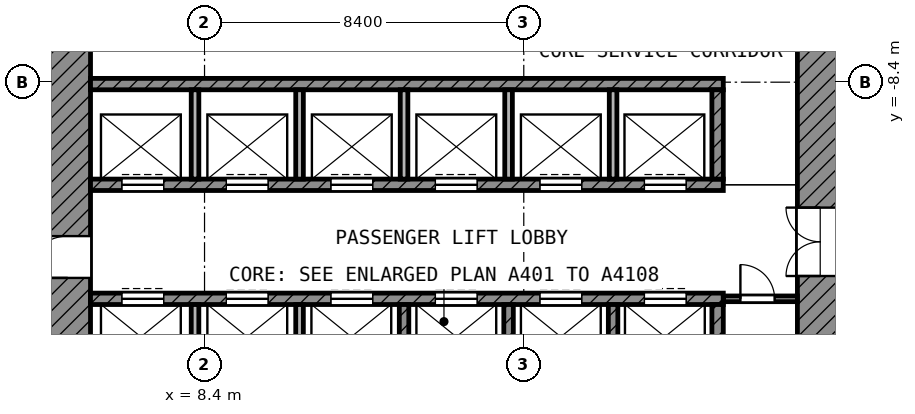
"""IFC4 building model, lengths in metres.
Left out: names, types, materials, properties, quantities, classifications, styles, units other than length and angle.
Written with IfcOpenShell. Run it as: python <this file> out.ifc"""

import sys

from ifc_helpers import new_model, si_unit, direction, frame, frame_2d, origin, place, context, subcontext, project, spatial, rectangle, extrude, element, fill, save


model = new_model("IFC4")
c1 = context("Model", 3, precision=1e-05, world=origin(), true_north=direction((0.0, 1.0)))
c2 = subcontext(c1, "Body", "Model", "MODEL_VIEW")
j1 = project(units=[si_unit("LENGTHUNIT", "METRE"), si_unit("PLANEANGLEUNIT", "RADIAN")], contexts=[c1])
p1 = place(None, origin())
s1 = spatial("IfcSite", under=j1, at=p1, CompositionType="ELEMENT")
p2 = place(p1, origin())
s2 = spatial("IfcBuilding", under=s1, at=p2, CompositionType="ELEMENT")
p3 = place(p2, origin())
s3 = spatial("IfcBuildingStorey", under=s2, at=p3, CompositionType="ELEMENT", Elevation=0.0)
p4 = place(p3, frame((4.8, -25.2, 0.0), z_axis=(0.0, 0.0, 1.0), x_axis=(0.0, 1.0, 0.0)))
e1 = element("IfcWall", 1, at=p4, inside=s3, PredefinedType="SHEAR", context=c2, shape_type="SweptSolid", body=[
    extrude(rectangle(XDim=19.8, YDim=1.2, at=frame_2d((9.9, 0.0))), origin(), (0.0, 0.0, 1.0), 6.65),
])
p5 = place(p4, frame((11.65, 0.0, 0.0)))
e2 = element("IfcOpeningElement", 2, at=p5, cuts=e1, PredefinedType="OPENING", context=c2, shape_type="SweptSolid", body=[
    extrude(rectangle(XDim=1.1, YDim=2.1, at=frame_2d((0.55, 1.05))), frame((0.0, 0.61, 0.0), z_axis=(0.0, -1.0, 0.0), x_axis=(1.0, 0.0, 0.0)), (0.0, 0.0, 1.0), 1.22),
])
p6 = place(p4, frame((2.35, 0.0, 0.0)))
e3 = element("IfcOpeningElement", 3, at=p6, cuts=e1, PredefinedType="OPENING", context=c2, shape_type="SweptSolid", body=[
    extrude(rectangle(XDim=1.1, YDim=2.1, at=frame_2d((0.55, 1.05))), frame((0.0, 0.61, 0.0), z_axis=(0.0, -1.0, 0.0), x_axis=(1.0, 0.0, 0.0)), (0.0, 0.0, 1.0), 1.22),
])
p7 = place(p3, frame((24.6, -24.0, 0.0), z_axis=(0.0, 0.0, 1.0), x_axis=(0.0, 1.0, 0.0)))
e4 = element("IfcWall", 4, at=p7, inside=s3, PredefinedType="SHEAR", context=c2, shape_type="SweptSolid", body=[
    extrude(rectangle(XDim=18.6, YDim=1.2, at=frame_2d((9.3, 0.0))), origin(), (0.0, 0.0, 1.0), 6.65),
])
p8 = place(p7, frame((10.5, 0.0, 0.0)))
e5 = element("IfcOpeningElement", 5, at=p8, cuts=e4, PredefinedType="OPENING", context=c2, shape_type="SweptSolid", body=[
    extrude(rectangle(XDim=1.8, YDim=2.1, at=frame_2d((0.9, 1.05))), frame((0.0, 0.61, 0.0), z_axis=(0.0, -1.0, 0.0), x_axis=(1.0, 0.0, 0.0)), (0.0, 0.0, 1.0), 1.22),
])
p9 = place(p3, frame((5.4, -8.45, 0.0), z_axis=(0.0, 0.0, 1.0), x_axis=(1.0, 0.0, 0.0)))
e6 = element("IfcWall", 6, at=p9, inside=s3, PredefinedType="SHEAR", context=c2, shape_type="SweptSolid", body=[
    extrude(rectangle(XDim=16.65, YDim=0.3, at=frame_2d((8.325, 0.0))), origin(), (0.0, 0.0, 1.0), 6.65),
])
p10 = place(p3, frame((5.4, -11.1, 0.0), z_axis=(0.0, 0.0, 1.0), x_axis=(1.0, 0.0, 0.0)))
e7 = element("IfcWall", 7, at=p10, inside=s3, PredefinedType="SHEAR", context=c2, shape_type="SweptSolid", body=[
    extrude(rectangle(XDim=16.65, YDim=0.3, at=frame_2d((8.325, 0.0))), origin(), (0.0, 0.0, 1.0), 6.65),
])
p11 = place(p10, frame((0.825, 0.0, 0.0)))
e8 = element("IfcOpeningElement", 8, at=p11, cuts=e7, PredefinedType="OPENING", context=c2, shape_type="SweptSolid", body=[
    extrude(rectangle(XDim=1.1, YDim=2.1, at=frame_2d((0.55, 1.05))), frame((0.0, 0.16, 0.0), z_axis=(0.0, -1.0, 0.0), x_axis=(1.0, 0.0, 0.0)), (0.0, 0.0, 1.0), 0.32),
])
p12 = place(p10, frame((3.575, 0.0, 0.0)))
e9 = element("IfcOpeningElement", 9, at=p12, cuts=e7, PredefinedType="OPENING", context=c2, shape_type="SweptSolid", body=[
    extrude(rectangle(XDim=1.1, YDim=2.1, at=frame_2d((0.55, 1.05))), frame((0.0, 0.16, 0.0), z_axis=(0.0, -1.0, 0.0), x_axis=(1.0, 0.0, 0.0)), (0.0, 0.0, 1.0), 0.32),
])
p13 = place(p10, frame((6.325, 0.0, 0.0)))
e10 = element("IfcOpeningElement", 10, at=p13, cuts=e7, PredefinedType="OPENING", context=c2, shape_type="SweptSolid", body=[
    extrude(rectangle(XDim=1.1, YDim=2.1, at=frame_2d((0.55, 1.05))), frame((0.0, 0.16, 0.0), z_axis=(0.0, -1.0, 0.0), x_axis=(1.0, 0.0, 0.0)), (0.0, 0.0, 1.0), 0.32),
])
p14 = place(p10, frame((9.075, 0.0, 0.0)))
e11 = element("IfcOpeningElement", 11, at=p14, cuts=e7, PredefinedType="OPENING", context=c2, shape_type="SweptSolid", body=[
    extrude(rectangle(XDim=1.1, YDim=2.1, at=frame_2d((0.55, 1.05))), frame((0.0, 0.16, 0.0), z_axis=(0.0, -1.0, 0.0), x_axis=(1.0, 0.0, 0.0)), (0.0, 0.0, 1.0), 0.32),
])
p15 = place(p10, frame((11.825, 0.0, 0.0)))
e12 = element("IfcOpeningElement", 12, at=p15, cuts=e7, PredefinedType="OPENING", context=c2, shape_type="SweptSolid", body=[
    extrude(rectangle(XDim=1.1, YDim=2.1, at=frame_2d((0.55, 1.05))), frame((0.0, 0.16, 0.0), z_axis=(0.0, -1.0, 0.0), x_axis=(1.0, 0.0, 0.0)), (0.0, 0.0, 1.0), 0.32),
])
p16 = place(p10, frame((14.575, 0.0, 0.0)))
e13 = element("IfcOpeningElement", 13, at=p16, cuts=e7, PredefinedType="OPENING", context=c2, shape_type="SweptSolid", body=[
    extrude(rectangle(XDim=1.1, YDim=2.1, at=frame_2d((0.55, 1.05))), frame((0.0, 0.16, 0.0), z_axis=(0.0, -1.0, 0.0), x_axis=(1.0, 0.0, 0.0)), (0.0, 0.0, 1.0), 0.32),
])
p17 = place(p3, frame((5.4, -14.1, 0.0), z_axis=(0.0, 0.0, 1.0), x_axis=(1.0, 0.0, 0.0)))
e14 = element("IfcWall", 14, at=p17, inside=s3, PredefinedType="SHEAR", context=c2, shape_type="SweptSolid", body=[
    extrude(rectangle(XDim=16.65, YDim=0.3, at=frame_2d((8.325, 0.0))), origin(), (0.0, 0.0, 1.0), 6.65),
])
p18 = place(p17, frame((0.825, 0.0, 0.0)))
e15 = element("IfcOpeningElement", 15, at=p18, cuts=e14, PredefinedType="OPENING", context=c2, shape_type="SweptSolid", body=[
    extrude(rectangle(XDim=1.1, YDim=2.1, at=frame_2d((0.55, 1.05))), frame((0.0, 0.16, 0.0), z_axis=(0.0, -1.0, 0.0), x_axis=(1.0, 0.0, 0.0)), (0.0, 0.0, 1.0), 0.32),
])
p19 = place(p17, frame((3.575, 0.0, 0.0)))
e16 = element("IfcOpeningElement", 16, at=p19, cuts=e14, PredefinedType="OPENING", context=c2, shape_type="SweptSolid", body=[
    extrude(rectangle(XDim=1.1, YDim=2.1, at=frame_2d((0.55, 1.05))), frame((0.0, 0.16, 0.0), z_axis=(0.0, -1.0, 0.0), x_axis=(1.0, 0.0, 0.0)), (0.0, 0.0, 1.0), 0.32),
])
p20 = place(p17, frame((6.325, 0.0, 0.0)))
e17 = element("IfcOpeningElement", 17, at=p20, cuts=e14, PredefinedType="OPENING", context=c2, shape_type="SweptSolid", body=[
    extrude(rectangle(XDim=1.1, YDim=2.1, at=frame_2d((0.55, 1.05))), frame((0.0, 0.16, 0.0), z_axis=(0.0, -1.0, 0.0), x_axis=(1.0, 0.0, 0.0)), (0.0, 0.0, 1.0), 0.32),
])
p21 = place(p17, frame((9.075, 0.0, 0.0)))
e18 = element("IfcOpeningElement", 18, at=p21, cuts=e14, PredefinedType="OPENING", context=c2, shape_type="SweptSolid", body=[
    extrude(rectangle(XDim=1.1, YDim=2.1, at=frame_2d((0.55, 1.05))), frame((0.0, 0.16, 0.0), z_axis=(0.0, -1.0, 0.0), x_axis=(1.0, 0.0, 0.0)), (0.0, 0.0, 1.0), 0.32),
])
p22 = place(p17, frame((11.825, 0.0, 0.0)))
e19 = element("IfcOpeningElement", 19, at=p22, cuts=e14, PredefinedType="OPENING", context=c2, shape_type="SweptSolid", body=[
    extrude(rectangle(XDim=1.1, YDim=2.1, at=frame_2d((0.55, 1.05))), frame((0.0, 0.16, 0.0), z_axis=(0.0, -1.0, 0.0), x_axis=(1.0, 0.0, 0.0)), (0.0, 0.0, 1.0), 0.32),
])
p23 = place(p17, frame((14.575, 0.0, 0.0)))
e20 = element("IfcOpeningElement", 20, at=p23, cuts=e14, PredefinedType="OPENING", context=c2, shape_type="SweptSolid", body=[
    extrude(rectangle(XDim=1.1, YDim=2.1, at=frame_2d((0.55, 1.05))), frame((0.0, 0.16, 0.0), z_axis=(0.0, -1.0, 0.0), x_axis=(1.0, 0.0, 0.0)), (0.0, 0.0, 1.0), 0.32),
])
p24 = place(p3, frame((21.9, -10.95, 0.0), z_axis=(0.0, 0.0, 1.0), x_axis=(0.0, 1.0, 0.0)))
e21 = element("IfcWall", 21, at=p24, inside=s3, PredefinedType="SHEAR", context=c2, shape_type="SweptSolid", body=[
    extrude(rectangle(XDim=2.35, YDim=0.3, at=frame_2d((1.175, 0.0))), origin(), (0.0, 0.0, 1.0), 6.65),
])
p25 = place(p3, frame((21.9, -16.6, 0.0), z_axis=(0.0, 0.0, 1.0), x_axis=(0.0, 1.0, 0.0)))
e22 = element("IfcWall", 22, at=p25, inside=s3, PredefinedType="SHEAR", context=c2, shape_type="SweptSolid", body=[
    extrude(rectangle(XDim=2.35, YDim=0.3, at=frame_2d((1.175, 0.0))), origin(), (0.0, 0.0, 1.0), 6.65),
])
for number, where, z_axis, x_axis in (
    (23, (8.15, -10.95, 0.0), (0.0, 0.0, 1.0), (0.0, 1.0, 0.0)),
    (24, (10.9, -10.95, 0.0), (0.0, 0.0, 1.0), (0.0, 1.0, 0.0)),
    (25, (13.65, -10.95, 0.0), (0.0, 0.0, 1.0), (0.0, 1.0, 0.0)),
    (26, (16.4, -10.95, 0.0), (0.0, 0.0, 1.0), (0.0, 1.0, 0.0)),
    (27, (19.15, -10.95, 0.0), (0.0, 0.0, 1.0), (0.0, 1.0, 0.0)),
):
    element("IfcWall", number, at=place(p3, frame(where, z_axis=z_axis, x_axis=x_axis)), inside=s3, PredefinedType="PARTITIONING", context=c2, shape_type="SweptSolid", body=[
        extrude(rectangle(XDim=2.35, YDim=0.2, at=frame_2d((1.175, 0.0))), origin(), (0.0, 0.0, 1.0), 6.65),
    ])
for number, where, z_axis, x_axis in (
    (28, (8.15, -16.6, 0.0), (0.0, 0.0, 1.0), (0.0, 1.0, 0.0)),
    (29, (10.9, -16.6, 0.0), (0.0, 0.0, 1.0), (0.0, 1.0, 0.0)),
):
    element("IfcWall", number, at=place(p3, frame(where, z_axis=z_axis, x_axis=x_axis)), inside=s3, PredefinedType="PARTITIONING", context=c2, shape_type="SweptSolid", body=[
        extrude(rectangle(XDim=2.35, YDim=0.2, at=frame_2d((1.175, 0.0))), origin(), (0.0, 0.0, 1.0), 6.65),
    ])
for number, where, z_axis, x_axis in (
    (30, (13.65, -16.6, 0.0), (0.0, 0.0, 1.0), (0.0, 1.0, 0.0)),
    (31, (16.4, -16.6, 0.0), (0.0, 0.0, 1.0), (0.0, 1.0, 0.0)),
    (32, (19.15, -16.6, 0.0), (0.0, 0.0, 1.0), (0.0, 1.0, 0.0)),
):
    element("IfcWall", number, at=place(p3, frame(where, z_axis=z_axis, x_axis=x_axis)), inside=s3, PredefinedType="SHEAR", context=c2, shape_type="SweptSolid", body=[
        extrude(rectangle(XDim=2.35, YDim=0.25, at=frame_2d((1.175, 0.0))), origin(), (0.0, 0.0, 1.0), 6.65),
    ])
p26 = place(p3, frame((22.05, -14.1, 0.0), z_axis=(0.0, 0.0, 1.0), x_axis=(1.0, 0.0, 0.0)))
e33 = element("IfcWall", 33, at=p26, inside=s3, PredefinedType="PARTITIONING", context=c2, shape_type="SweptSolid", body=[
    extrude(rectangle(XDim=1.95, YDim=0.15, at=frame_2d((0.975, 0.0))), origin(), (0.0, 0.0, 1.0), 6.65),
])
p27 = place(p26, frame((0.45, 0.0, 0.0)))
e34 = element("IfcOpeningElement", 34, at=p27, cuts=e33, PredefinedType="OPENING", context=c2, shape_type="SweptSolid", body=[
    extrude(rectangle(XDim=0.9, YDim=2.1, at=frame_2d((0.45, 1.05))), frame((0.0, 0.085, 0.0), z_axis=(0.0, -1.0, 0.0), x_axis=(1.0, 0.0, 0.0)), (0.0, 0.0, 1.0), 0.17),
])
p28 = place(p11, origin())
e35 = element("IfcDoor", 35, at=p28, inside=s3, OperationType="DOUBLE_DOOR_SLIDING", PredefinedType="DOOR", context=c2, shape_type="SweptSolid", body=[
    extrude(rectangle(XDim=1.1, YDim=2.1, at=frame_2d((0.55, 1.05))), frame((0.0, 0.025, 0.0), z_axis=(0.0, -1.0, 0.0), x_axis=(1.0, 0.0, 0.0)), (0.0, 0.0, 1.0), 0.05),
])
fill(e8, e35)
p29 = place(p12, origin())
e36 = element("IfcDoor", 36, at=p29, inside=s3, OperationType="DOUBLE_DOOR_SLIDING", PredefinedType="DOOR", context=c2, shape_type="SweptSolid", body=[
    extrude(rectangle(XDim=1.1, YDim=2.1, at=frame_2d((0.55, 1.05))), frame((0.0, 0.025, 0.0), z_axis=(0.0, -1.0, 0.0), x_axis=(1.0, 0.0, 0.0)), (0.0, 0.0, 1.0), 0.05),
])
fill(e9, e36)
p30 = place(p13, origin())
e37 = element("IfcDoor", 37, at=p30, inside=s3, OperationType="DOUBLE_DOOR_SLIDING", PredefinedType="DOOR", context=c2, shape_type="SweptSolid", body=[
    extrude(rectangle(XDim=1.1, YDim=2.1, at=frame_2d((0.55, 1.05))), frame((0.0, 0.025, 0.0), z_axis=(0.0, -1.0, 0.0), x_axis=(1.0, 0.0, 0.0)), (0.0, 0.0, 1.0), 0.05),
])
fill(e10, e37)
p31 = place(p14, origin())
e38 = element("IfcDoor", 38, at=p31, inside=s3, OperationType="DOUBLE_DOOR_SLIDING", PredefinedType="DOOR", context=c2, shape_type="SweptSolid", body=[
    extrude(rectangle(XDim=1.1, YDim=2.1, at=frame_2d((0.55, 1.05))), frame((0.0, 0.025, 0.0), z_axis=(0.0, -1.0, 0.0), x_axis=(1.0, 0.0, 0.0)), (0.0, 0.0, 1.0), 0.05),
])
fill(e11, e38)
p32 = place(p15, origin())
e39 = element("IfcDoor", 39, at=p32, inside=s3, OperationType="DOUBLE_DOOR_SLIDING", PredefinedType="DOOR", context=c2, shape_type="SweptSolid", body=[
    extrude(rectangle(XDim=1.1, YDim=2.1, at=frame_2d((0.55, 1.05))), frame((0.0, 0.025, 0.0), z_axis=(0.0, -1.0, 0.0), x_axis=(1.0, 0.0, 0.0)), (0.0, 0.0, 1.0), 0.05),
])
fill(e12, e39)
p33 = place(p16, origin())
e40 = element("IfcDoor", 40, at=p33, inside=s3, OperationType="DOUBLE_DOOR_SLIDING", PredefinedType="DOOR", context=c2, shape_type="SweptSolid", body=[
    extrude(rectangle(XDim=1.1, YDim=2.1, at=frame_2d((0.55, 1.05))), frame((0.0, 0.025, 0.0), z_axis=(0.0, -1.0, 0.0), x_axis=(1.0, 0.0, 0.0)), (0.0, 0.0, 1.0), 0.05),
])
fill(e13, e40)
p34 = place(p18, origin())
e41 = element("IfcDoor", 41, at=p34, inside=s3, OperationType="DOUBLE_DOOR_SLIDING", PredefinedType="DOOR", context=c2, shape_type="SweptSolid", body=[
    extrude(rectangle(XDim=1.1, YDim=2.1, at=frame_2d((0.55, 1.05))), frame((0.0, 0.025, 0.0), z_axis=(0.0, -1.0, 0.0), x_axis=(1.0, 0.0, 0.0)), (0.0, 0.0, 1.0), 0.05),
])
fill(e15, e41)
p35 = place(p19, origin())
e42 = element("IfcDoor", 42, at=p35, inside=s3, OperationType="DOUBLE_DOOR_SLIDING", PredefinedType="DOOR", context=c2, shape_type="SweptSolid", body=[
    extrude(rectangle(XDim=1.1, YDim=2.1, at=frame_2d((0.55, 1.05))), frame((0.0, 0.025, 0.0), z_axis=(0.0, -1.0, 0.0), x_axis=(1.0, 0.0, 0.0)), (0.0, 0.0, 1.0), 0.05),
])
fill(e16, e42)
p36 = place(p20, origin())
e43 = element("IfcDoor", 43, at=p36, inside=s3, OperationType="DOUBLE_DOOR_SLIDING", PredefinedType="DOOR", context=c2, shape_type="SweptSolid", body=[
    extrude(rectangle(XDim=1.1, YDim=2.1, at=frame_2d((0.55, 1.05))), frame((0.0, 0.025, 0.0), z_axis=(0.0, -1.0, 0.0), x_axis=(1.0, 0.0, 0.0)), (0.0, 0.0, 1.0), 0.05),
])
fill(e17, e43)
p37 = place(p21, origin())
e44 = element("IfcDoor", 44, at=p37, inside=s3, OperationType="DOUBLE_DOOR_SLIDING", PredefinedType="DOOR", context=c2, shape_type="SweptSolid", body=[
    extrude(rectangle(XDim=1.1, YDim=2.1, at=frame_2d((0.55, 1.05))), frame((0.0, 0.025, 0.0), z_axis=(0.0, -1.0, 0.0), x_axis=(1.0, 0.0, 0.0)), (0.0, 0.0, 1.0), 0.05),
])
fill(e18, e44)
p38 = place(p22, origin())
e45 = element("IfcDoor", 45, at=p38, inside=s3, OperationType="DOUBLE_DOOR_SLIDING", PredefinedType="DOOR", context=c2, shape_type="SweptSolid", body=[
    extrude(rectangle(XDim=1.1, YDim=2.1, at=frame_2d((0.55, 1.05))), frame((0.0, 0.025, 0.0), z_axis=(0.0, -1.0, 0.0), x_axis=(1.0, 0.0, 0.0)), (0.0, 0.0, 1.0), 0.05),
])
fill(e19, e45)
p39 = place(p23, origin())
e46 = element("IfcDoor", 46, at=p39, inside=s3, OperationType="DOUBLE_DOOR_SLIDING", PredefinedType="DOOR", context=c2, shape_type="SweptSolid", body=[
    extrude(rectangle(XDim=1.1, YDim=2.1, at=frame_2d((0.55, 1.05))), frame((0.0, 0.025, 0.0), z_axis=(0.0, -1.0, 0.0), x_axis=(1.0, 0.0, 0.0)), (0.0, 0.0, 1.0), 0.05),
])
fill(e20, e46)
p40 = place(p5, origin())
e47 = element("IfcDoor", 47, at=p40, inside=s3, OperationType="SINGLE_SWING_LEFT", PredefinedType="DOOR", context=c2, shape_type="SweptSolid", body=[
    extrude(rectangle(XDim=1.1, YDim=2.1, at=frame_2d((0.55, 1.05))), frame((0.0, 0.025, 0.0), z_axis=(0.0, -1.0, 0.0), x_axis=(1.0, 0.0, 0.0)), (0.0, 0.0, 1.0), 0.05),
])
fill(e2, e47)
p41 = place(p8, origin())
e48 = element("IfcDoor", 48, at=p41, inside=s3, OperationType="DOUBLE_DOOR_SINGLE_SWING", PredefinedType="DOOR", context=c2, shape_type="SweptSolid", body=[
    extrude(rectangle(XDim=1.8, YDim=2.1, at=frame_2d((0.9, 1.05))), frame((0.0, 0.025, 0.0), z_axis=(0.0, -1.0, 0.0), x_axis=(1.0, 0.0, 0.0)), (0.0, 0.0, 1.0), 0.05),
])
fill(e5, e48)
p42 = place(p27, origin())
e49 = element("IfcDoor", 49, at=p42, inside=s3, OperationType="SINGLE_SWING_LEFT", PredefinedType="DOOR", context=c2, shape_type="SweptSolid", body=[
    extrude(rectangle(XDim=0.9, YDim=2.1, at=frame_2d((0.45, 1.05))), frame((0.0, 0.025, 0.0), z_axis=(0.0, -1.0, 0.0), x_axis=(1.0, 0.0, 0.0)), (0.0, 0.0, 1.0), 0.05),
])
fill(e34, e49)
save(model, sys.argv[1])
